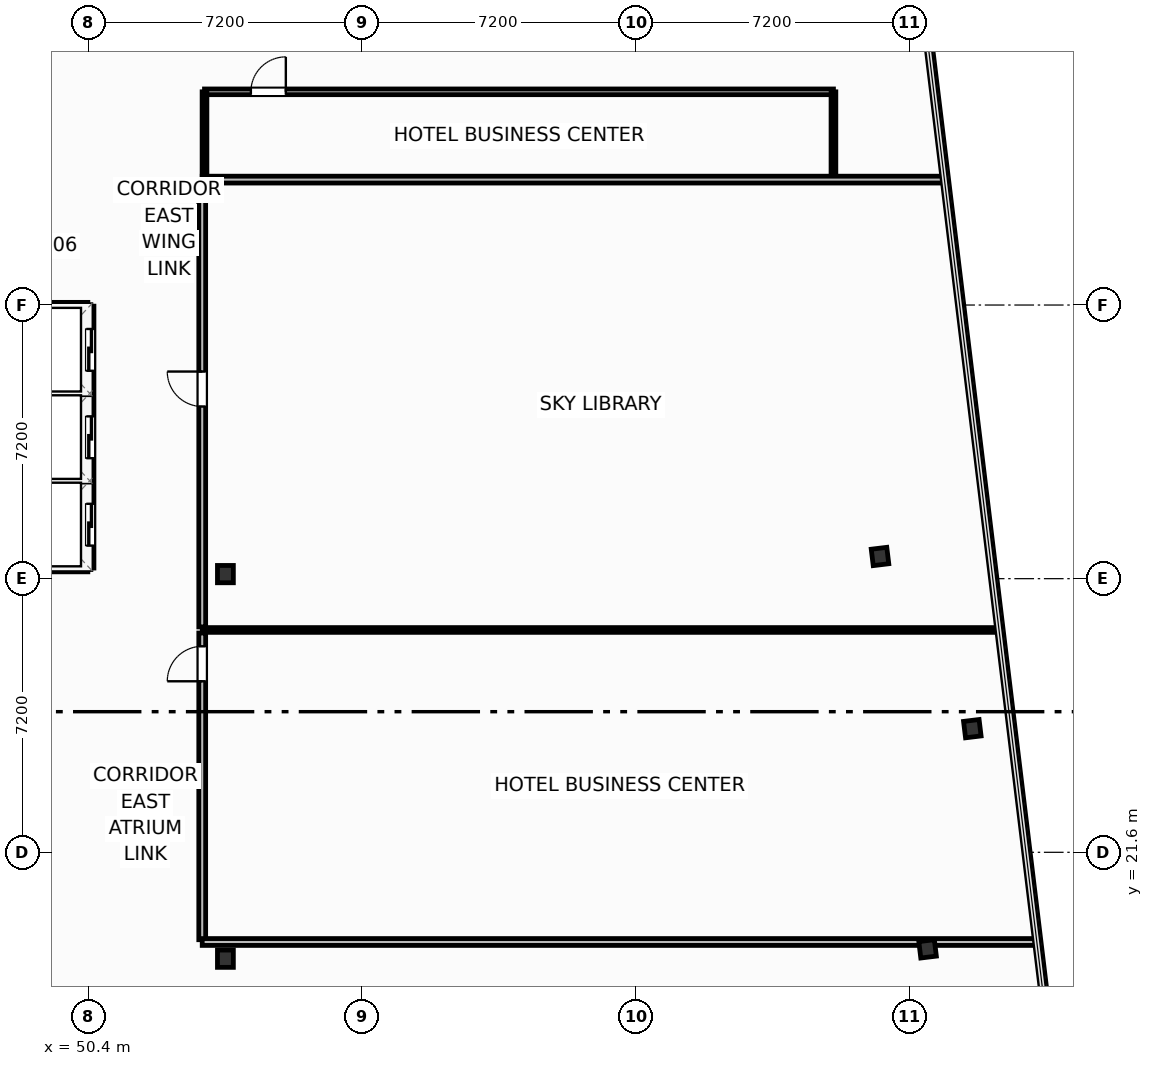
"""IFC4 building model, lengths in metres.
Left out: names, types, materials, properties, quantities, classifications, styles, units other than length and angle.
Written with IfcOpenShell. Run it as: python <this file> out.ifc"""

import sys

from ifc_helpers import new_model, si_unit, direction, frame, frame_2d, origin, origin_2d, place, context, subcontext, project, spatial, rectangle, i_section, extrude, element, fill, save


model = new_model("IFC4")
c1 = context("Model", 3, precision=1e-05, world=origin(), true_north=direction((0.0, 1.0)))
c2 = subcontext(c1, "Body", "Model", "MODEL_VIEW")
j1 = project(units=[si_unit("LENGTHUNIT", "METRE"), si_unit("PLANEANGLEUNIT", "RADIAN")], contexts=[c1])
p1 = place(None, origin())
s1 = spatial("IfcSite", under=j1, at=p1, CompositionType="ELEMENT")
p2 = place(p1, origin())
s2 = spatial("IfcBuilding", under=s1, at=p2, CompositionType="ELEMENT")
p3 = place(p2, frame((0.0, 0.0, 196.8)))
s3 = spatial("IfcBuildingStorey", under=s2, at=p3, CompositionType="ELEMENT", Elevation=196.8)
for number, where, z_axis, x_axis in (
    (1, (54.0, 18.8, 0.0), (0.0, 0.0, 1.0), (1.0, 0.0, 0.0)),
    (2, (54.0, 28.92, 0.0), (0.0, 0.0, 1.0), (1.0, 0.0, 0.0)),
):
    element("IfcColumn", number, at=place(p3, frame(where, z_axis=z_axis, x_axis=x_axis)), inside=s3, PredefinedType="COLUMN", context=c2, shape_type="SweptSolid", body=[
        extrude(i_section(OverallWidth=0.418, OverallDepth=0.455, WebThickness=0.042, FlangeThickness=0.068, FilletRadius=0.025, at=origin_2d()), origin(), (0.0, 0.0, 1.0), 3.7),
    ])
for number, where, z_axis, x_axis in (
    (3, (72.477, 19.059, 0.0), (0.0, 0.0, 1.0), (0.993, 0.12, 0.0)),
    (4, (73.654, 24.853, 0.0), (0.0, 0.0, 1.0), (0.993, 0.12, 0.0)),
    (5, (71.225, 29.384, 0.0), (0.0, 0.0, 1.0), (0.993, 0.12, 0.0)),
):
    element("IfcColumn", number, at=place(p3, frame(where, z_axis=z_axis, x_axis=x_axis)), inside=s3, PredefinedType="COLUMN", context=c2, shape_type="SweptSolid", body=[
        extrude(i_section(OverallWidth=0.412, OverallDepth=0.435, WebThickness=0.036, FlangeThickness=0.057, FilletRadius=0.025, at=origin_2d()), origin(), (0.0, 0.0, 1.0), 3.7),
    ])
p4 = place(p3, frame((53.45, 41.61, 0.0), z_axis=(0.0, 0.0, 1.0), x_axis=(1.0, 0.0, 0.0)))
e6 = element("IfcWall", 6, at=p4, inside=s3, PredefinedType="PARTITIONING", context=c2, shape_type="SweptSolid", body=[
    extrude(rectangle(XDim=16.55, YDim=0.15, at=frame_2d((8.275, 0.0))), origin(), (0.0, 0.0, 1.0), 3.45),
])
p5 = place(p4, frame((1.22, 0.0, 0.0)))
e7 = element("IfcOpeningElement", 7, at=p5, cuts=e6, PredefinedType="OPENING", context=c2, shape_type="SweptSolid", body=[
    extrude(rectangle(XDim=0.92, YDim=2.05, at=frame_2d((0.46, 1.025))), frame((0.0, 0.085, 0.0), z_axis=(0.0, -1.0, 0.0), x_axis=(1.0, 0.0, 0.0)), (0.0, 0.0, 1.0), 0.17),
])
for number, where, z_axis, x_axis in (
    (8, (53.45, 39.3, 0.0), (0.0, 0.0, 1.0), (0.0, 1.0, 0.0)),
    (9, (70.0, 39.3, 0.0), (0.0, 0.0, 1.0), (0.0, 1.0, 0.0)),
):
    element("IfcWall", number, at=place(p3, frame(where, z_axis=z_axis, x_axis=x_axis)), inside=s3, PredefinedType="PARTITIONING", context=c2, shape_type="SweptSolid", body=[
        extrude(rectangle(XDim=2.31, YDim=0.125, at=frame_2d((1.155, 0.0))), origin(), (0.0, 0.0, 1.0), 3.45),
    ])
p6 = place(p3, frame((53.39, 19.3, 0.0), z_axis=(0.0, 0.0, 1.0), x_axis=(0.0, 1.0, 0.0)))
e10 = element("IfcWall", 10, at=p6, inside=s3, PredefinedType="PARTITIONING", context=c2, shape_type="SweptSolid", body=[
    extrude(rectangle(XDim=8.07, YDim=0.18, at=frame_2d((4.035, 0.0))), origin(), (0.0, 0.0, 1.0), 3.45),
])
p7 = place(p6, frame((6.8, 0.0, 0.0)))
e11 = element("IfcOpeningElement", 11, at=p7, cuts=e10, PredefinedType="OPENING", context=c2, shape_type="SweptSolid", body=[
    extrude(rectangle(XDim=0.92, YDim=2.05, at=frame_2d((0.46, 1.025))), frame((0.0, 0.1, 0.0), z_axis=(0.0, -1.0, 0.0), x_axis=(1.0, 0.0, 0.0)), (0.0, 0.0, 1.0), 0.2),
])
p8 = place(p3, frame((53.39, 27.53, 0.0), z_axis=(0.0, 0.0, 1.0), x_axis=(0.0, 1.0, 0.0)))
e12 = element("IfcWall", 12, at=p8, inside=s3, PredefinedType="PARTITIONING", context=c2, shape_type="SweptSolid", body=[
    extrude(rectangle(XDim=11.67, YDim=0.18, at=frame_2d((5.835, 0.0))), origin(), (0.0, 0.0, 1.0), 3.45),
])
p9 = place(p8, frame((5.8, 0.0, 0.0)))
e13 = element("IfcOpeningElement", 13, at=p9, cuts=e12, PredefinedType="OPENING", context=c2, shape_type="SweptSolid", body=[
    extrude(rectangle(XDim=0.92, YDim=2.05, at=frame_2d((0.46, 1.025))), frame((0.0, 0.1, 0.0), z_axis=(0.0, -1.0, 0.0), x_axis=(1.0, 0.0, 0.0)), (0.0, 0.0, 1.0), 0.2),
])
p10 = place(p3, frame((53.39, 27.45, 0.0), z_axis=(0.0, 0.0, 1.0), x_axis=(1.0, 0.0, 0.0)))
e14 = element("IfcWall", 14, at=p10, inside=s3, PredefinedType="PARTITIONING", context=c2, shape_type="SweptSolid", body=[
    extrude(rectangle(XDim=20.927, YDim=0.125, at=frame_2d((10.463, 0.0))), origin(), (0.0, 0.0, 1.0), 2.662),
])
p11 = place(p3, frame((53.39, 19.24, 0.0), z_axis=(0.0, 0.0, 1.0), x_axis=(1.0, 0.0, 0.0)))
e15 = element("IfcWall", 15, at=p11, inside=s3, PredefinedType="PARTITIONING", context=c2, shape_type="SweptSolid", body=[
    extrude(rectangle(XDim=21.922, YDim=0.18, at=frame_2d((10.961, 0.0))), origin(), (0.0, 0.0, 1.0), 2.662),
])
p12 = place(p3, frame((53.39, 39.3, 0.0), z_axis=(0.0, 0.0, 1.0), x_axis=(1.0, 0.0, 0.0)))
e16 = element("IfcWall", 16, at=p12, inside=s3, PredefinedType="PARTITIONING", context=c2, shape_type="SweptSolid", body=[
    extrude(rectangle(XDim=19.49, YDim=0.18, at=frame_2d((9.745, 0.0))), origin(), (0.0, 0.0, 1.0), 3.45),
])
for number, where, z_axis, x_axis in (
    (17, (48.32, 31.375, 0.0), (0.0, 0.0, 1.0), (1.0, 0.0, 0.0)),
    (18, (48.32, 33.675, 0.0), (0.0, 0.0, 1.0), (1.0, 0.0, 0.0)),
):
    element("IfcWall", number, at=place(p3, frame(where, z_axis=z_axis, x_axis=x_axis)), inside=s3, PredefinedType="PARTITIONING", context=c2, shape_type="SweptSolid", body=[
        extrude(rectangle(XDim=2.06, YDim=0.2, at=frame_2d((1.03, 0.0))), origin(), (0.0, 0.0, 1.0), 3.45),
    ])
p13 = place(p3, frame((48.32, 29.08, 0.0), z_axis=(0.0, 0.0, 1.0), x_axis=(1.0, 0.0, 0.0)))
e19 = element("IfcWall", 19, at=p13, inside=s3, PredefinedType="PARTITIONING", context=c2, shape_type="SweptSolid", body=[
    extrude(rectangle(XDim=2.06, YDim=0.2, at=frame_2d((1.03, 0.0))), origin(), (0.0, 0.0, 1.0), 2.662),
])
p14 = place(p3, frame((48.32, 35.97, 0.0), z_axis=(0.0, 0.0, 1.0), x_axis=(1.0, 0.0, 0.0)))
e20 = element("IfcWall", 20, at=p14, inside=s3, PredefinedType="PARTITIONING", context=c2, shape_type="SweptSolid", body=[
    extrude(rectangle(XDim=2.06, YDim=0.2, at=frame_2d((1.03, 0.0))), origin(), (0.0, 0.0, 1.0), 3.45),
])
p15 = place(p3, frame((50.44, 29.08, 0.0), z_axis=(0.0, 0.0, 1.0), x_axis=(0.0, 1.0, 0.0)))
e21 = element("IfcWall", 21, at=p15, inside=s3, PredefinedType="PARTITIONING", context=c2, shape_type="SweptSolid", body=[
    extrude(rectangle(XDim=6.89, YDim=0.2, at=frame_2d((3.445, 0.0))), origin(), (0.0, 0.0, 1.0), 3.45),
])
p16 = place(p15, frame((0.59, 0.0, 0.0)))
e22 = element("IfcOpeningElement", 22, at=p16, cuts=e21, PredefinedType="OPENING", context=c2, shape_type="SweptSolid", body=[
    extrude(rectangle(XDim=1.1, YDim=2.15, at=frame_2d((0.55, 1.075))), frame((0.0, 0.11, 0.0), z_axis=(0.0, -1.0, 0.0), x_axis=(1.0, 0.0, 0.0)), (0.0, 0.0, 1.0), 0.22),
])
p17 = place(p15, frame((2.89, 0.0, 0.0)))
e23 = element("IfcOpeningElement", 23, at=p17, cuts=e21, PredefinedType="OPENING", context=c2, shape_type="SweptSolid", body=[
    extrude(rectangle(XDim=1.1, YDim=2.15, at=frame_2d((0.55, 1.075))), frame((0.0, 0.11, 0.0), z_axis=(0.0, -1.0, 0.0), x_axis=(1.0, 0.0, 0.0)), (0.0, 0.0, 1.0), 0.22),
])
p18 = place(p15, frame((5.19, 0.0, 0.0)))
e24 = element("IfcOpeningElement", 24, at=p18, cuts=e21, PredefinedType="OPENING", context=c2, shape_type="SweptSolid", body=[
    extrude(rectangle(XDim=1.1, YDim=2.15, at=frame_2d((0.55, 1.075))), frame((0.0, 0.11, 0.0), z_axis=(0.0, -1.0, 0.0), x_axis=(1.0, 0.0, 0.0)), (0.0, 0.0, 1.0), 0.22),
])
p19 = place(p5, origin())
e25 = element("IfcDoor", 25, at=p19, inside=s3, OperationType="SINGLE_SWING_RIGHT", PredefinedType="DOOR", context=c2, shape_type="SweptSolid", body=[
    extrude(rectangle(XDim=0.92, YDim=2.05, at=frame_2d((0.46, 1.025))), frame((0.0, 0.025, 0.0), z_axis=(0.0, -1.0, 0.0), x_axis=(1.0, 0.0, 0.0)), (0.0, 0.0, 1.0), 0.05),
])
fill(e7, e25)
p20 = place(p7, origin())
e26 = element("IfcDoor", 26, at=p20, inside=s3, OperationType="SINGLE_SWING_LEFT", PredefinedType="DOOR", context=c2, shape_type="SweptSolid", body=[
    extrude(rectangle(XDim=0.92, YDim=2.05, at=frame_2d((0.46, 1.025))), frame((0.0, 0.025, 0.0), z_axis=(0.0, -1.0, 0.0), x_axis=(1.0, 0.0, 0.0)), (0.0, 0.0, 1.0), 0.05),
])
fill(e11, e26)
p21 = place(p9, origin())
e27 = element("IfcDoor", 27, at=p21, inside=s3, OperationType="SINGLE_SWING_RIGHT", PredefinedType="DOOR", context=c2, shape_type="SweptSolid", body=[
    extrude(rectangle(XDim=0.92, YDim=2.05, at=frame_2d((0.46, 1.025))), frame((0.0, 0.025, 0.0), z_axis=(0.0, -1.0, 0.0), x_axis=(1.0, 0.0, 0.0)), (0.0, 0.0, 1.0), 0.05),
])
fill(e13, e27)
p22 = place(p16, origin())
e28 = element("IfcDoor", 28, at=p22, inside=s3, OperationType="SLIDING_TO_LEFT", PredefinedType="DOOR", context=c2, shape_type="SweptSolid", body=[
    extrude(rectangle(XDim=1.1, YDim=2.15, at=frame_2d((0.55, 1.075))), frame((0.0, 0.025, 0.0), z_axis=(0.0, -1.0, 0.0), x_axis=(1.0, 0.0, 0.0)), (0.0, 0.0, 1.0), 0.05),
])
fill(e22, e28)
p23 = place(p17, origin())
e29 = element("IfcDoor", 29, at=p23, inside=s3, OperationType="SLIDING_TO_LEFT", PredefinedType="DOOR", context=c2, shape_type="SweptSolid", body=[
    extrude(rectangle(XDim=1.1, YDim=2.15, at=frame_2d((0.55, 1.075))), frame((0.0, 0.025, 0.0), z_axis=(0.0, -1.0, 0.0), x_axis=(1.0, 0.0, 0.0)), (0.0, 0.0, 1.0), 0.05),
])
fill(e23, e29)
p24 = place(p18, origin())
e30 = element("IfcDoor", 30, at=p24, inside=s3, OperationType="SLIDING_TO_LEFT", PredefinedType="DOOR", context=c2, shape_type="SweptSolid", body=[
    extrude(rectangle(XDim=1.1, YDim=2.15, at=frame_2d((0.55, 1.075))), frame((0.0, 0.025, 0.0), z_axis=(0.0, -1.0, 0.0), x_axis=(1.0, 0.0, 0.0)), (0.0, 0.0, 1.0), 0.05),
])
fill(e24, e30)
save(model, sys.argv[1])
